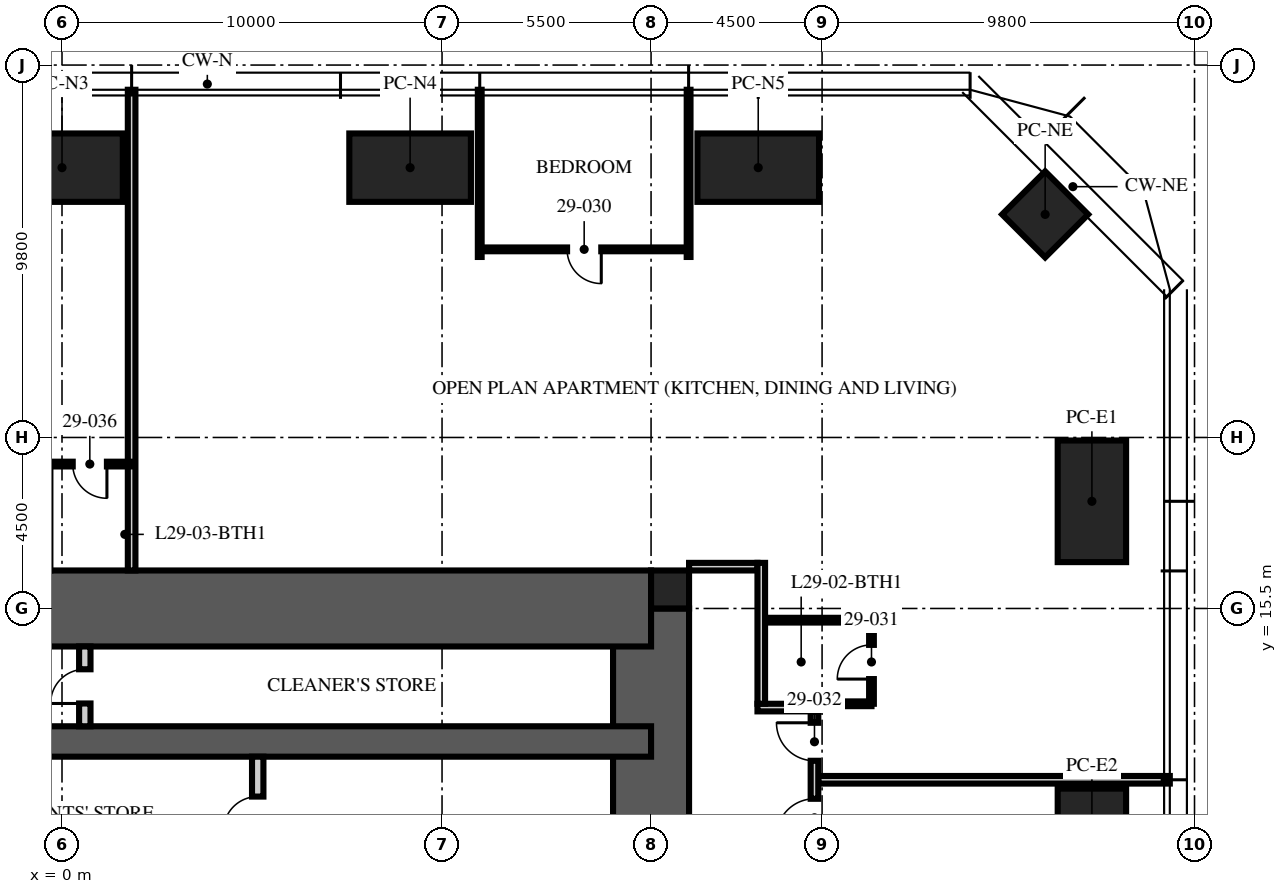
"""IFC4 building model, lengths in metres.
Left out: names, types, materials, properties, quantities, classifications, styles, units other than length and angle.
Written with IfcOpenShell. Run it as: python <this file> out.ifc"""

import sys

from ifc_helpers import new_model, si_unit, direction, frame, frame_2d, origin, origin_2d, place, context, subcontext, project, spatial, rectangle, hollow_rectangle, extrude, element, fill, save


model = new_model("IFC4")
c1 = context("Model", 3, precision=1e-05, world=origin(), true_north=direction((0.0, 1.0)))
c2 = subcontext(c1, "Body", "Model", "MODEL_VIEW")
j1 = project(units=[si_unit("LENGTHUNIT", "METRE"), si_unit("PLANEANGLEUNIT", "RADIAN")], contexts=[c1])
p1 = place(None, origin())
s1 = spatial("IfcSite", under=j1, at=p1, CompositionType="ELEMENT")
p2 = place(p1, origin())
s2 = spatial("IfcBuilding", under=s1, at=p2, CompositionType="ELEMENT")
p3 = place(p2, frame((0.0, 0.0, 118.5)))
s3 = spatial("IfcBuildingStorey", under=s2, at=p3, CompositionType="ELEMENT", Elevation=118.5)
p4 = place(p3, frame((15.5, -15.5, -0.25), z_axis=(0.0, 0.0, 1.0), x_axis=(0.0, 1.0, 0.0)))
e1 = element("IfcWall", 1, at=p4, inside=s3, PredefinedType="SHEAR", context=c2, shape_type="SweptSolid", body=[
    extrude(rectangle(XDim=31.0, YDim=2.0, at=frame_2d((15.5, 0.0))), origin(), (0.0, 0.0, 1.0), 3.75),
])
p5 = place(p4, frame((6.5, 0.0, 0.25)))
e2 = element("IfcOpeningElement", 2, at=p5, cuts=e1, PredefinedType="OPENING", context=c2, shape_type="SweptSolid", body=[
    extrude(rectangle(XDim=1.2, YDim=2.1, at=frame_2d((0.6, 1.05))), frame((0.0, 1.01, 0.0), z_axis=(0.0, -1.0, 0.0), x_axis=(1.0, 0.0, 0.0)), (0.0, 0.0, 1.0), 2.02),
])
p6 = place(p4, frame((23.0, 0.0, 0.25)))
e3 = element("IfcOpeningElement", 3, at=p6, cuts=e1, PredefinedType="OPENING", context=c2, shape_type="SweptSolid", body=[
    extrude(rectangle(XDim=1.8, YDim=2.1, at=frame_2d((0.9, 1.05))), frame((0.0, 1.01, 0.0), z_axis=(0.0, -1.0, 0.0), x_axis=(1.0, 0.0, 0.0)), (0.0, 0.0, 1.0), 2.02),
])
p7 = place(p3, frame((-15.5, 15.5, -0.25), z_axis=(0.0, 0.0, 1.0), x_axis=(1.0, 0.0, 0.0)))
e4 = element("IfcWall", 4, at=p7, inside=s3, PredefinedType="SHEAR", context=c2, shape_type="SweptSolid", body=[
    extrude(rectangle(XDim=31.0, YDim=2.0, at=frame_2d((15.5, 0.0))), origin(), (0.0, 0.0, 1.0), 3.75),
])
p8 = place(p7, frame((5.0, 0.0, 0.25)))
e5 = element("IfcOpeningElement", 5, at=p8, cuts=e4, PredefinedType="OPENING", context=c2, shape_type="SweptSolid", body=[
    extrude(rectangle(XDim=1.0, YDim=2.1, at=frame_2d((0.5, 1.05))), frame((0.0, 1.01, 0.0), z_axis=(0.0, -1.0, 0.0), x_axis=(1.0, 0.0, 0.0)), (0.0, 0.0, 1.0), 2.02),
])
p9 = place(p3, frame((-15.5, 12.0, -0.25), z_axis=(0.0, 0.0, 1.0), x_axis=(1.0, 0.0, 0.0)))
e6 = element("IfcWall", 6, at=p9, inside=s3, PredefinedType="SHEAR", context=c2, shape_type="SweptSolid", body=[
    extrude(rectangle(XDim=31.0, YDim=0.8, at=frame_2d((15.5, 0.0))), origin(), (0.0, 0.0, 1.0), 3.75),
])
p10 = place(p3, frame((16.0, 16.0, -0.25), z_axis=(0.0, 0.0, 1.0), x_axis=(1.0, 0.0, 0.0)))
e7 = element("IfcColumn", 7, at=p10, inside=s3, PredefinedType="COLUMN", context=c2, shape_type="SweptSolid", body=[
    extrude(rectangle(XDim=1.0, YDim=1.0, at=origin_2d()), origin(), (0.0, 0.0, 1.0), 3.75),
])
for number, where, z_axis, x_axis in (
    (8, (0.0, 27.1, 0.0), (0.0, 0.0, 1.0), (1.0, 0.0, 0.0)),
    (9, (9.16, 27.1, 0.0), (0.0, 0.0, 1.0), (1.0, 0.0, 0.0)),
    (10, (18.32, 27.1, 0.0), (0.0, 0.0, 1.0), (1.0, 0.0, 0.0)),
    (11, (27.1, 18.32, 0.0), (0.0, 0.0, 1.0), (0.0, 1.0, 0.0)),
    (12, (27.1, 9.16, 0.0), (0.0, 0.0, 1.0), (0.0, 1.0, 0.0)),
):
    element("IfcColumn", number, at=place(p3, frame(where, z_axis=z_axis, x_axis=x_axis)), inside=s3, PredefinedType="COLUMN", context=c2, shape_type="SweptSolid", body=[
        extrude(hollow_rectangle(XDim=3.2, YDim=1.8, WallThickness=0.2, at=origin_2d()), origin(), (0.0, 0.0, 1.0), 3.75),
    ])
p11 = place(p3, frame((25.87, 25.87, 0.0), z_axis=(0.0, 0.0, 1.0), x_axis=(0.707106781187, -0.707106781187, 0.0)))
e13 = element("IfcColumn", 13, at=p11, inside=s3, PredefinedType="COLUMN", context=c2, shape_type="SweptSolid", body=[
    extrude(hollow_rectangle(XDim=1.6, YDim=1.6, WallThickness=0.1, at=origin_2d()), origin(), (0.0, 0.0, 1.0), 3.75),
])
p12 = place(p3, frame((5.15, 5.3, 0.0), z_axis=(0.0, 0.0, 1.0), x_axis=(0.0, 1.0, 0.0)))
e14 = element("IfcWall", 14, at=p12, inside=s3, PredefinedType="PARTITIONING", context=c2, shape_type="SweptSolid", body=[
    extrude(rectangle(XDim=6.3, YDim=0.3, at=frame_2d((3.15, 0.0))), origin(), (0.0, 0.0, 1.0), 3.5),
])
p13 = place(p12, frame((4.35, 0.0, 0.0)))
e15 = element("IfcOpeningElement", 15, at=p13, cuts=e14, PredefinedType="OPENING", context=c2, shape_type="SweptSolid", body=[
    extrude(rectangle(XDim=0.9, YDim=2.1, at=frame_2d((0.45, 1.05))), frame((0.0, 0.16, 0.0), z_axis=(0.0, -1.0, 0.0), x_axis=(1.0, 0.0, 0.0)), (0.0, 0.0, 1.0), 0.32),
])
p14 = place(p3, frame((0.6, 12.4, 0.0), z_axis=(0.0, 0.0, 1.0), x_axis=(0.0, 1.0, 0.0)))
e16 = element("IfcWall", 16, at=p14, inside=s3, PredefinedType="PARTITIONING", context=c2, shape_type="SweptSolid", body=[
    extrude(rectangle(XDim=2.1, YDim=0.3, at=frame_2d((1.05, 0.0))), origin(), (0.0, 0.0, 1.0), 3.5),
])
p15 = place(p14, frame((0.6, 0.0, 0.0)))
e17 = element("IfcOpeningElement", 17, at=p15, cuts=e16, PredefinedType="OPENING", context=c2, shape_type="SweptSolid", body=[
    extrude(rectangle(XDim=0.9, YDim=2.1, at=frame_2d((0.45, 1.05))), frame((0.0, 0.16, 0.0), z_axis=(0.0, -1.0, 0.0), x_axis=(1.0, 0.0, 0.0)), (0.0, 0.0, 1.0), 0.32),
])
p16 = place(p3, frame((16.5, 16.6, 0.0), z_axis=(0.0, 0.0, 1.0), x_axis=(1.0, 0.0, 0.0)))
e18 = element("IfcWall", 18, at=p16, inside=s3, PredefinedType="PARTITIONING", context=c2, shape_type="SweptSolid", body=[
    extrude(rectangle(XDim=1.8, YDim=0.2, at=frame_2d((0.9, 0.0))), origin(), (0.0, 0.0, 1.0), 2.3),
])
p17 = place(p3, frame((19.9, 10.992, 0.0), z_axis=(0.0, 0.0, 1.0), x_axis=(1.0, 0.0, 0.0)))
e19 = element("IfcWall", 19, at=p17, inside=s3, PredefinedType="PARTITIONING", context=c2, shape_type="SweptSolid", body=[
    extrude(rectangle(XDim=9.25, YDim=0.2, at=frame_2d((4.625, 0.0))), origin(), (0.0, 0.0, 1.0), 2.81),
])
for number, where, z_axis, x_axis in (
    (20, (16.488, 24.75, 0.0), (0.0, 0.0, 1.0), (0.0, 1.0, 0.0)),
    (21, (10.992, 24.75, 0.0), (0.0, 0.0, 1.0), (0.0, 1.0, 0.0)),
):
    element("IfcWall", number, at=place(p3, frame(where, z_axis=z_axis, x_axis=x_axis)), inside=s3, PredefinedType="PARTITIONING", context=c2, shape_type="SweptSolid", body=[
        extrude(rectangle(XDim=4.4, YDim=0.1, at=frame_2d((2.2, 0.0))), origin(), (0.0, 0.0, 1.0), 2.81),
    ])
p18 = place(p3, frame((1.832, 16.5, 0.0), z_axis=(0.0, 0.0, 1.0), x_axis=(0.0, 1.0, 0.0)))
e22 = element("IfcWall", 22, at=p18, inside=s3, PredefinedType="PARTITIONING", context=c2, shape_type="SweptSolid", body=[
    extrude(rectangle(XDim=12.65, YDim=0.2, at=frame_2d((6.325, 0.0))), origin(), (0.0, 0.0, 1.0), 2.81),
])
p19 = place(p3, frame((16.488, 24.95, 0.0), z_axis=(0.0, 0.0, 1.0), x_axis=(-1.0, 0.0, 0.0)))
e23 = element("IfcWall", 23, at=p19, inside=s3, PredefinedType="PARTITIONING", context=c2, shape_type="SweptSolid", body=[
    extrude(rectangle(XDim=5.496, YDim=0.1, at=frame_2d((2.748, 0.0))), origin(), (0.0, 0.0, 1.0), 2.81),
])
p20 = place(p19, frame((2.298, 0.0, 0.0)))
e24 = element("IfcOpeningElement", 24, at=p20, cuts=e23, PredefinedType="OPENING", context=c2, shape_type="SweptSolid", body=[
    extrude(rectangle(XDim=0.9, YDim=2.1, at=frame_2d((0.45, 1.05))), frame((0.0, 0.06, 0.0), z_axis=(0.0, -1.0, 0.0), x_axis=(1.0, 0.0, 0.0)), (0.0, 0.0, 1.0), 0.12),
])
p21 = place(p3, frame((21.3, 12.992, 0.0), z_axis=(0.0, 0.0, 1.0), x_axis=(0.0, 1.0, 0.0)))
e25 = element("IfcWall", 25, at=p21, inside=s3, PredefinedType="PARTITIONING", context=c2, shape_type="SweptSolid", body=[
    extrude(rectangle(XDim=2.2, YDim=0.125, at=frame_2d((1.1, 0.0))), origin(), (0.0, 0.0, 1.0), 2.81),
])
p22 = place(p21, frame((0.65, 0.0, 0.0)))
e26 = element("IfcOpeningElement", 26, at=p22, cuts=e25, PredefinedType="OPENING", context=c2, shape_type="SweptSolid", body=[
    extrude(rectangle(XDim=0.9, YDim=2.1, at=frame_2d((0.45, 1.05))), frame((0.0, 0.073, 0.0), z_axis=(0.0, -1.0, 0.0), x_axis=(1.0, 0.0, 0.0)), (0.0, 0.0, 1.0), 0.145),
])
p23 = place(p3, frame((19.97, 12.992, 0.0), z_axis=(0.0, 0.0, 1.0), x_axis=(1.0, 0.0, 0.0)))
e27 = element("IfcWall", 27, at=p23, inside=s3, PredefinedType="PARTITIONING", context=c2, shape_type="SweptSolid", body=[
    extrude(rectangle(XDim=1.33, YDim=0.125, at=frame_2d((0.665, 0.0))), origin(), (0.0, 0.0, 1.0), 3.5),
])
p24 = place(p3, frame((18.5, 15.192, 0.0), z_axis=(0.0, 0.0, 1.0), x_axis=(1.0, 0.0, 0.0)))
e28 = element("IfcWall", 28, at=p24, inside=s3, PredefinedType="PARTITIONING", context=c2, shape_type="SweptSolid", body=[
    extrude(rectangle(XDim=2.8, YDim=0.125, at=frame_2d((1.4, 0.0))), origin(), (0.0, 0.0, 1.0), 3.5),
])
p25 = place(p3, frame((1.832, 19.3, 0.0), z_axis=(0.0, 0.0, 1.0), x_axis=(-1.0, 0.0, 0.0)))
e29 = element("IfcWall", 29, at=p25, inside=s3, PredefinedType="PARTITIONING", context=c2, shape_type="SweptSolid", body=[
    extrude(rectangle(XDim=4.4, YDim=0.125, at=frame_2d((2.2, 0.0))), origin(), (0.0, 0.0, 1.0), 2.7),
])
p26 = place(p25, frame((0.65, 0.0, 0.0)))
e30 = element("IfcOpeningElement", 30, at=p26, cuts=e29, PredefinedType="OPENING", context=c2, shape_type="SweptSolid", body=[
    extrude(rectangle(XDim=0.9, YDim=2.1, at=frame_2d((0.45, 1.05))), frame((0.0, 0.073, 0.0), z_axis=(0.0, -1.0, 0.0), x_axis=(1.0, 0.0, 0.0)), (0.0, 0.0, 1.0), 0.145),
])
p27 = place(p25, frame((2.85, 0.0, 0.0)))
e31 = element("IfcOpeningElement", 31, at=p27, cuts=e29, PredefinedType="OPENING", context=c2, shape_type="SweptSolid", body=[
    extrude(rectangle(XDim=0.9, YDim=2.1, at=frame_2d((0.45, 1.05))), frame((0.0, 0.073, 0.0), z_axis=(0.0, -1.0, 0.0), x_axis=(1.0, 0.0, 0.0)), (0.0, 0.0, 1.0), 0.145),
])
p28 = place(p3, frame((18.3, 12.892, 0.0), z_axis=(0.0, 0.0, 1.0), x_axis=(1.0, 0.0, 0.0)))
e32 = element("IfcWall", 32, at=p28, inside=s3, PredefinedType="PARTITIONING", context=c2, shape_type="SweptSolid", body=[
    extrude(rectangle(XDim=1.6, YDim=0.2, at=frame_2d((0.8, 0.0))), origin(), (0.0, 0.0, 1.0), 3.5),
])
p29 = place(p3, frame((19.8, 9.192, 0.0), z_axis=(0.0, 0.0, 1.0), x_axis=(0.0, 1.0, 0.0)))
e33 = element("IfcWall", 33, at=p29, inside=s3, PredefinedType="PARTITIONING", context=c2, shape_type="SweptSolid", body=[
    extrude(rectangle(XDim=3.6, YDim=0.2, at=frame_2d((1.8, 0.0))), origin(), (0.0, 0.0, 1.0), 2.7),
])
p30 = place(p29, frame((0.3, 0.0, 0.0)))
e34 = element("IfcOpeningElement", 34, at=p30, cuts=e33, PredefinedType="OPENING", context=c2, shape_type="SweptSolid", body=[
    extrude(rectangle(XDim=1.0, YDim=2.2, at=frame_2d((0.5, 1.1))), frame((0.0, 0.11, 0.0), z_axis=(0.0, -1.0, 0.0), x_axis=(1.0, 0.0, 0.0)), (0.0, 0.0, 1.0), 0.22),
])
p31 = place(p29, frame((2.3, 0.0, 0.0)))
e35 = element("IfcOpeningElement", 35, at=p31, cuts=e33, PredefinedType="OPENING", context=c2, shape_type="SweptSolid", body=[
    extrude(rectangle(XDim=1.0, YDim=2.2, at=frame_2d((0.5, 1.1))), frame((0.0, 0.11, 0.0), z_axis=(0.0, -1.0, 0.0), x_axis=(1.0, 0.0, 0.0)), (0.0, 0.0, 1.0), 0.22),
])
p32 = place(p3, frame((18.4, 12.992, 0.0), z_axis=(0.0, 0.0, 1.0), x_axis=(0.0, 1.0, 0.0)))
e36 = element("IfcWall", 36, at=p32, inside=s3, PredefinedType="PARTITIONING", context=c2, shape_type="SweptSolid", body=[
    extrude(rectangle(XDim=3.708, YDim=0.2, at=frame_2d((1.854, 0.0))), origin(), (0.0, 0.0, 1.0), 2.81),
])
p33 = place(p13, origin())
e37 = element("IfcDoor", 37, at=p33, inside=s3, OperationType="SINGLE_SWING_LEFT", PredefinedType="DOOR", context=c2, shape_type="SweptSolid", body=[
    extrude(rectangle(XDim=0.9, YDim=2.1, at=frame_2d((0.45, 1.05))), frame((0.0, 0.025, 0.0), z_axis=(0.0, -1.0, 0.0), x_axis=(1.0, 0.0, 0.0)), (0.0, 0.0, 1.0), 0.05),
])
fill(e15, e37)
p34 = place(p15, origin())
e38 = element("IfcDoor", 38, at=p34, inside=s3, OperationType="SINGLE_SWING_LEFT", PredefinedType="DOOR", context=c2, shape_type="SweptSolid", body=[
    extrude(rectangle(XDim=0.9, YDim=2.1, at=frame_2d((0.45, 1.05))), frame((0.0, 0.025, 0.0), z_axis=(0.0, -1.0, 0.0), x_axis=(1.0, 0.0, 0.0)), (0.0, 0.0, 1.0), 0.05),
])
fill(e17, e38)
p35 = place(p30, origin())
e39 = element("IfcDoor", 39, at=p35, inside=s3, OperationType="SINGLE_SWING_LEFT", PredefinedType="DOOR", context=c2, shape_type="SweptSolid", body=[
    extrude(rectangle(XDim=1.0, YDim=2.2, at=frame_2d((0.5, 1.1))), frame((0.0, 0.025, 0.0), z_axis=(0.0, -1.0, 0.0), x_axis=(1.0, 0.0, 0.0)), (0.0, 0.0, 1.0), 0.05),
])
fill(e34, e39)
p36 = place(p20, origin())
e40 = element("IfcDoor", 40, at=p36, inside=s3, OperationType="SINGLE_SWING_LEFT", PredefinedType="DOOR", context=c2, shape_type="SweptSolid", body=[
    extrude(rectangle(XDim=0.9, YDim=2.1, at=frame_2d((0.45, 1.05))), frame((0.0, 0.025, 0.0), z_axis=(0.0, -1.0, 0.0), x_axis=(1.0, 0.0, 0.0)), (0.0, 0.0, 1.0), 0.05),
])
fill(e24, e40)
p37 = place(p22, origin())
e41 = element("IfcDoor", 41, at=p37, inside=s3, OperationType="SINGLE_SWING_LEFT", PredefinedType="DOOR", context=c2, shape_type="SweptSolid", body=[
    extrude(rectangle(XDim=0.9, YDim=2.1, at=frame_2d((0.45, 1.05))), frame((0.0, 0.025, 0.0), z_axis=(0.0, -1.0, 0.0), x_axis=(1.0, 0.0, 0.0)), (0.0, 0.0, 1.0), 0.05),
])
fill(e26, e41)
p38 = place(p31, origin())
e42 = element("IfcDoor", 42, at=p38, inside=s3, OperationType="SINGLE_SWING_RIGHT", PredefinedType="DOOR", context=c2, shape_type="SweptSolid", body=[
    extrude(rectangle(XDim=1.0, YDim=2.2, at=frame_2d((0.5, 1.1))), frame((0.0, 0.025, 0.0), z_axis=(0.0, -1.0, 0.0), x_axis=(1.0, 0.0, 0.0)), (0.0, 0.0, 1.0), 0.05),
])
fill(e35, e42)
p39 = place(p26, origin())
e43 = element("IfcDoor", 43, at=p39, inside=s3, OperationType="SINGLE_SWING_LEFT", PredefinedType="DOOR", context=c2, shape_type="SweptSolid", body=[
    extrude(rectangle(XDim=0.9, YDim=2.1, at=frame_2d((0.45, 1.05))), frame((0.0, 0.025, 0.0), z_axis=(0.0, -1.0, 0.0), x_axis=(1.0, 0.0, 0.0)), (0.0, 0.0, 1.0), 0.05),
])
fill(e30, e43)
save(model, sys.argv[1])
